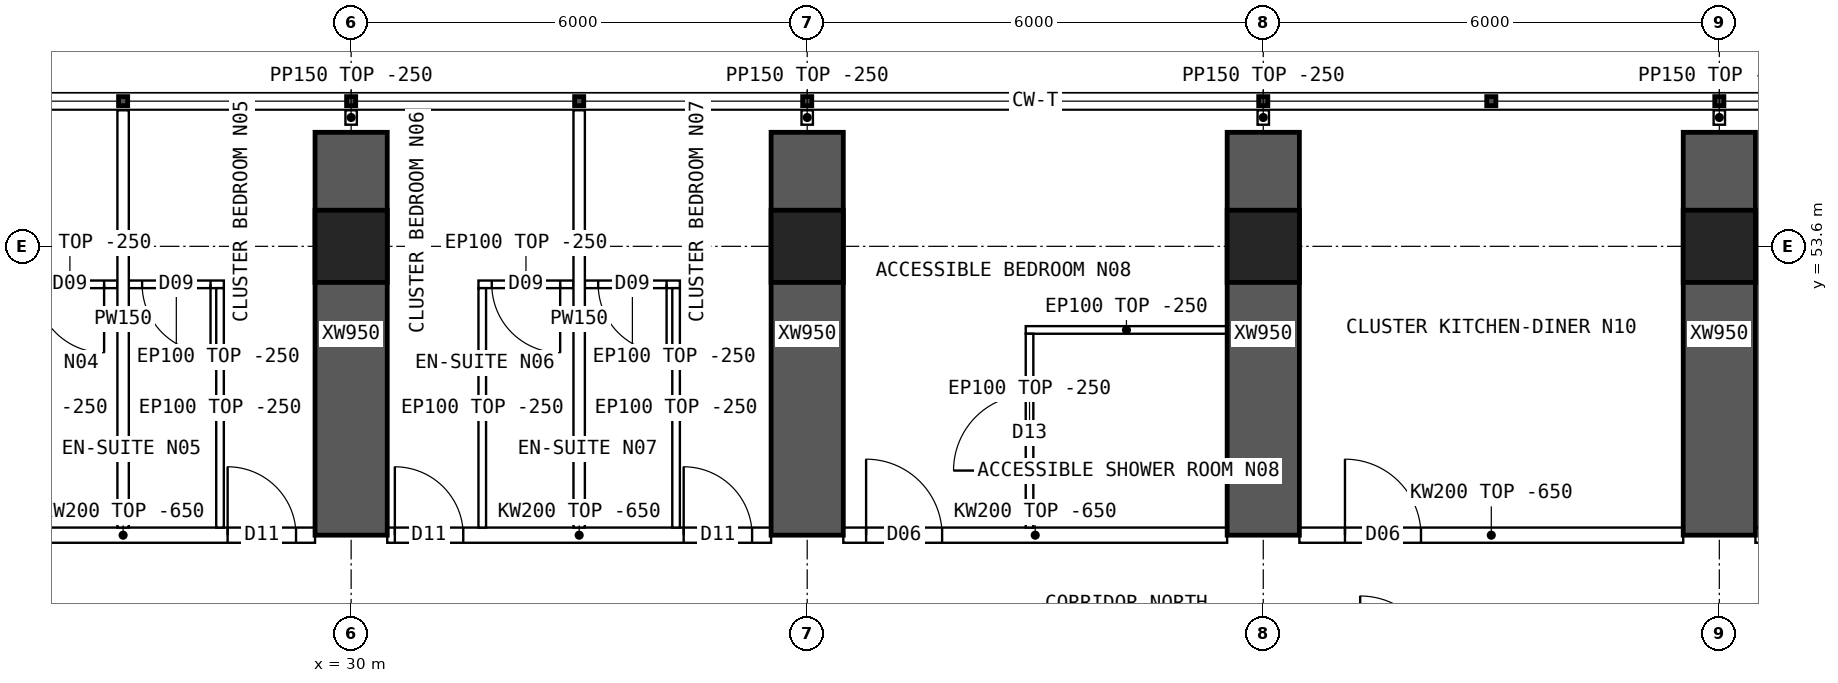
"""IFC4 building model, lengths in metres.
Left out: names, types, materials, properties, quantities, classifications, styles, units other than length and angle.
Written with IfcOpenShell. Run it as: python <this file> out.ifc"""

import sys

from ifc_helpers import new_model, si_unit, direction, frame, frame_2d, origin, origin_2d, place, context, subcontext, project, spatial, polyline, rectangle, hollow_rectangle, outline, extrude, element, fill, save


model = new_model("IFC4")
c1 = context("Model", 3, precision=1e-05, world=origin(), true_north=direction((0.0, 1.0)))
c2 = subcontext(c1, "Body", "Model", "MODEL_VIEW")
j1 = project(units=[si_unit("LENGTHUNIT", "METRE"), si_unit("PLANEANGLEUNIT", "RADIAN")], contexts=[c1])
p1 = place(None, origin())
s1 = spatial("IfcSite", under=j1, at=p1, CompositionType="ELEMENT")
p2 = place(p1, origin())
s2 = spatial("IfcBuilding", under=s1, at=p2, CompositionType="ELEMENT")
p3 = place(p2, frame((0.0, 0.0, 114.4)))
s3 = spatial("IfcBuildingStorey", under=s2, at=p3, CompositionType="ELEMENT", Elevation=114.4)
for number, where, z_axis, x_axis in (
    (1, (30.0, 53.6, 0.0), (0.0, 0.0, 1.0), (1.0, 0.0, 0.0)),
    (2, (36.0, 53.6, 0.0), (0.0, 0.0, 1.0), (1.0, 0.0, 0.0)),
    (3, (42.0, 53.6, 0.0), (0.0, 0.0, 1.0), (1.0, 0.0, 0.0)),
    (4, (48.0, 53.6, 0.0), (0.0, 0.0, 1.0), (1.0, 0.0, 0.0)),
):
    element("IfcColumn", number, at=place(p3, frame(where, z_axis=z_axis, x_axis=x_axis)), inside=s3, PredefinedType="COLUMN", context=c2, shape_type="SweptSolid", body=[
        extrude(hollow_rectangle(XDim=0.95, YDim=0.95, WallThickness=0.095, at=origin_2d()), origin(), (0.0, 0.0, 1.0), 3.75),
    ])
for number, where, z_axis, x_axis in (
    (5, (30.0, 49.8, 0.0), (0.0, 0.0, 1.0), (0.0, 1.0, 0.0)),
    (6, (36.0, 49.8, 0.0), (0.0, 0.0, 1.0), (0.0, 1.0, 0.0)),
    (7, (42.0, 49.8, 0.0), (0.0, 0.0, 1.0), (0.0, 1.0, 0.0)),
    (8, (48.0, 49.8, 0.0), (0.0, 0.0, 1.0), (0.0, 1.0, 0.0)),
):
    element("IfcWall", number, at=place(p3, frame(where, z_axis=z_axis, x_axis=x_axis)), inside=s3, PredefinedType="SHEAR", context=c2, shape_type="SweptSolid", body=[
        extrude(rectangle(XDim=5.3, YDim=0.95, at=frame_2d((2.65, 0.0))), origin(), (0.0, 0.0, 1.0), 3.75),
    ])
p4 = place(p3, frame((24.475, 49.8, 0.0), z_axis=(0.0, 0.0, 1.0), x_axis=(1.0, 0.0, 0.0)))
e9 = element("IfcWall", 9, at=p4, inside=s3, PredefinedType="SOLIDWALL", context=c2, shape_type="SweptSolid", body=[
    extrude(outline(polyline([(0.0, 0.0), (5.05, 0.0), (5.05, 3.1), (0.0, 3.1), (0.0, 0.0)])), frame((0.0, 0.1, 0.0), z_axis=(0.0, -1.0, 0.0), x_axis=(1.0, 0.0, 0.0)), (0.0, 0.0, 1.0), 0.2),
])
p5 = place(p4, frame((0.1, 0.0, 0.0)))
e10 = element("IfcOpeningElement", 10, at=p5, cuts=e9, PredefinedType="OPENING", context=c2, shape_type="SweptSolid", body=[
    extrude(rectangle(XDim=0.9, YDim=2.1, at=frame_2d((0.45, 1.05))), frame((0.0, 0.11, 0.0), z_axis=(0.0, -1.0, 0.0), x_axis=(1.0, 0.0, 0.0)), (0.0, 0.0, 1.0), 0.22),
])
p6 = place(p4, frame((3.9, 0.0, 0.0)))
e11 = element("IfcOpeningElement", 11, at=p6, cuts=e9, PredefinedType="OPENING", context=c2, shape_type="SweptSolid", body=[
    extrude(rectangle(XDim=0.9, YDim=2.1, at=frame_2d((0.45, 1.05))), frame((0.0, 0.11, 0.0), z_axis=(0.0, -1.0, 0.0), x_axis=(1.0, 0.0, 0.0)), (0.0, 0.0, 1.0), 0.22),
])
p7 = place(p3, frame((30.475, 49.8, 0.0), z_axis=(0.0, 0.0, 1.0), x_axis=(1.0, 0.0, 0.0)))
e12 = element("IfcWall", 12, at=p7, inside=s3, PredefinedType="SOLIDWALL", context=c2, shape_type="SweptSolid", body=[
    extrude(outline(polyline([(0.0, 0.0), (5.05, 0.0), (5.05, 3.1), (0.0, 3.1), (0.0, 0.0)])), frame((0.0, 0.1, 0.0), z_axis=(0.0, -1.0, 0.0), x_axis=(1.0, 0.0, 0.0)), (0.0, 0.0, 1.0), 0.2),
])
p8 = place(p7, frame((0.1, 0.0, 0.0)))
e13 = element("IfcOpeningElement", 13, at=p8, cuts=e12, PredefinedType="OPENING", context=c2, shape_type="SweptSolid", body=[
    extrude(rectangle(XDim=0.9, YDim=2.1, at=frame_2d((0.45, 1.05))), frame((0.0, 0.11, 0.0), z_axis=(0.0, -1.0, 0.0), x_axis=(1.0, 0.0, 0.0)), (0.0, 0.0, 1.0), 0.22),
])
p9 = place(p7, frame((3.9, 0.0, 0.0)))
e14 = element("IfcOpeningElement", 14, at=p9, cuts=e12, PredefinedType="OPENING", context=c2, shape_type="SweptSolid", body=[
    extrude(rectangle(XDim=0.9, YDim=2.1, at=frame_2d((0.45, 1.05))), frame((0.0, 0.11, 0.0), z_axis=(0.0, -1.0, 0.0), x_axis=(1.0, 0.0, 0.0)), (0.0, 0.0, 1.0), 0.22),
])
p10 = place(p3, frame((36.475, 49.8, 0.0), z_axis=(0.0, 0.0, 1.0), x_axis=(1.0, 0.0, 0.0)))
e15 = element("IfcWall", 15, at=p10, inside=s3, PredefinedType="SOLIDWALL", context=c2, shape_type="SweptSolid", body=[
    extrude(outline(polyline([(0.0, 0.0), (5.05, 0.0), (5.05, 3.1), (0.0, 3.1), (0.0, 0.0)])), frame((0.0, 0.1, 0.0), z_axis=(0.0, -1.0, 0.0), x_axis=(1.0, 0.0, 0.0)), (0.0, 0.0, 1.0), 0.2),
])
p11 = place(p10, frame((0.3, 0.0, 0.0)))
e16 = element("IfcOpeningElement", 16, at=p11, cuts=e15, PredefinedType="OPENING", context=c2, shape_type="SweptSolid", body=[
    extrude(rectangle(XDim=1.0, YDim=2.1, at=frame_2d((0.5, 1.05))), frame((0.0, 0.11, 0.0), z_axis=(0.0, -1.0, 0.0), x_axis=(1.0, 0.0, 0.0)), (0.0, 0.0, 1.0), 0.22),
])
p12 = place(p3, frame((42.475, 49.8, 0.0), z_axis=(0.0, 0.0, 1.0), x_axis=(1.0, 0.0, 0.0)))
e17 = element("IfcWall", 17, at=p12, inside=s3, PredefinedType="SOLIDWALL", context=c2, shape_type="SweptSolid", body=[
    extrude(outline(polyline([(0.0, 0.0), (5.05, 0.0), (5.05, 3.1), (0.0, 3.1), (0.0, 0.0)])), frame((0.0, 0.1, 0.0), z_axis=(0.0, -1.0, 0.0), x_axis=(1.0, 0.0, 0.0)), (0.0, 0.0, 1.0), 0.2),
])
p13 = place(p12, frame((0.6, 0.0, 0.0)))
e18 = element("IfcOpeningElement", 18, at=p13, cuts=e17, PredefinedType="OPENING", context=c2, shape_type="SweptSolid", body=[
    extrude(rectangle(XDim=1.0, YDim=2.1, at=frame_2d((0.5, 1.05))), frame((0.0, 0.11, 0.0), z_axis=(0.0, -1.0, 0.0), x_axis=(1.0, 0.0, 0.0)), (0.0, 0.0, 1.0), 0.22),
])
p14 = place(p3, frame((48.475, 49.8, 0.0), z_axis=(0.0, 0.0, 1.0), x_axis=(1.0, 0.0, 0.0)))
e19 = element("IfcWall", 19, at=p14, inside=s3, PredefinedType="SOLIDWALL", context=c2, shape_type="SweptSolid", body=[
    extrude(outline(polyline([(0.0, 0.0), (5.05, 0.0), (5.05, 3.1), (0.0, 3.1), (0.0, 0.0)])), frame((0.0, 0.1, 0.0), z_axis=(0.0, -1.0, 0.0), x_axis=(1.0, 0.0, 0.0)), (0.0, 0.0, 1.0), 0.2),
])
p15 = place(p14, frame((0.1, 0.0, 0.0)))
e20 = element("IfcOpeningElement", 20, at=p15, cuts=e19, PredefinedType="OPENING", context=c2, shape_type="SweptSolid", body=[
    extrude(rectangle(XDim=0.9, YDim=2.1, at=frame_2d((0.45, 1.05))), frame((0.0, 0.11, 0.0), z_axis=(0.0, -1.0, 0.0), x_axis=(1.0, 0.0, 0.0)), (0.0, 0.0, 1.0), 0.22),
])
p16 = place(p14, frame((3.9, 0.0, 0.0)))
e21 = element("IfcOpeningElement", 21, at=p16, cuts=e19, PredefinedType="OPENING", context=c2, shape_type="SweptSolid", body=[
    extrude(rectangle(XDim=0.9, YDim=2.1, at=frame_2d((0.45, 1.05))), frame((0.0, 0.11, 0.0), z_axis=(0.0, -1.0, 0.0), x_axis=(1.0, 0.0, 0.0)), (0.0, 0.0, 1.0), 0.22),
])
p17 = place(p3, frame((27.0, 55.39, 0.0), z_axis=(0.0, 0.0, 1.0), x_axis=(0.0, -1.0, 0.0)))
e22 = element("IfcWall", 22, at=p17, inside=s3, PredefinedType="PARTITIONING", context=c2, shape_type="SweptSolid", body=[
    extrude(outline(polyline([(0.0, 0.0), (5.49, 0.0), (5.49, 3.1), (5.442, 3.1), (5.44, 3.5), (1.992, 3.5), (1.99, 3.1), (1.592, 3.1), (1.59, 3.5), (0.0, 3.5), (0.0, 0.0)])), frame((0.0, 0.075, 0.0), z_axis=(0.0, -1.0, 0.0), x_axis=(1.0, 0.0, 0.0)), (0.0, 0.0, 1.0), 0.15),
])
p18 = place(p3, frame((25.675, 53.1, 0.0), z_axis=(0.0, 0.0, 1.0), x_axis=(1.0, 0.0, 0.0)))
e23 = element("IfcWall", 23, at=p18, inside=s3, PredefinedType="PARTITIONING", context=c2, shape_type="SweptSolid", body=[
    extrude(rectangle(XDim=1.25, YDim=0.1, at=frame_2d((0.625, 0.0))), origin(), (0.0, 0.0, 1.0), 3.5),
])
p19 = place(p18, frame((0.175, 0.0, 0.0)))
e24 = element("IfcOpeningElement", 24, at=p19, cuts=e23, PredefinedType="OPENING", context=c2, shape_type="SweptSolid", body=[
    extrude(rectangle(XDim=0.9, YDim=2.1, at=frame_2d((0.45, 1.05))), frame((0.0, 0.06, 0.0), z_axis=(0.0, -1.0, 0.0), x_axis=(1.0, 0.0, 0.0)), (0.0, 0.0, 1.0), 0.12),
])
p20 = place(p3, frame((27.075, 53.1, 0.0), z_axis=(0.0, 0.0, 1.0), x_axis=(1.0, 0.0, 0.0)))
e25 = element("IfcWall", 25, at=p20, inside=s3, PredefinedType="PARTITIONING", context=c2, shape_type="SweptSolid", body=[
    extrude(rectangle(XDim=1.25, YDim=0.1, at=frame_2d((0.625, 0.0))), origin(), (0.0, 0.0, 1.0), 3.5),
])
p21 = place(p20, frame((0.175, 0.0, 0.0)))
e26 = element("IfcOpeningElement", 26, at=p21, cuts=e25, PredefinedType="OPENING", context=c2, shape_type="SweptSolid", body=[
    extrude(rectangle(XDim=0.9, YDim=2.1, at=frame_2d((0.45, 1.05))), frame((0.0, 0.06, 0.0), z_axis=(0.0, -1.0, 0.0), x_axis=(1.0, 0.0, 0.0)), (0.0, 0.0, 1.0), 0.12),
])
p22 = place(p3, frame((28.275, 53.05, 0.0), z_axis=(0.0, 0.0, 1.0), x_axis=(0.0, -1.0, 0.0)))
e27 = element("IfcWall", 27, at=p22, inside=s3, PredefinedType="PARTITIONING", context=c2, shape_type="SweptSolid", body=[
    extrude(outline(polyline([(0.0, 0.0), (3.15, 0.0), (3.15, 3.1), (3.102, 3.1), (3.1, 3.5), (0.0, 3.5), (0.0, 0.0)])), frame((0.0, 0.05, 0.0), z_axis=(0.0, -1.0, 0.0), x_axis=(1.0, 0.0, 0.0)), (0.0, 0.0, 1.0), 0.1),
])
p23 = place(p3, frame((33.0, 55.39, 0.0), z_axis=(0.0, 0.0, 1.0), x_axis=(0.0, -1.0, 0.0)))
e28 = element("IfcWall", 28, at=p23, inside=s3, PredefinedType="PARTITIONING", context=c2, shape_type="SweptSolid", body=[
    extrude(outline(polyline([(0.0, 0.0), (5.49, 0.0), (5.49, 3.1), (5.442, 3.1), (5.44, 3.5), (1.992, 3.5), (1.99, 3.1), (1.592, 3.1), (1.59, 3.5), (0.0, 3.5), (0.0, 0.0)])), frame((0.0, 0.075, 0.0), z_axis=(0.0, -1.0, 0.0), x_axis=(1.0, 0.0, 0.0)), (0.0, 0.0, 1.0), 0.15),
])
p24 = place(p3, frame((31.675, 53.1, 0.0), z_axis=(0.0, 0.0, 1.0), x_axis=(1.0, 0.0, 0.0)))
e29 = element("IfcWall", 29, at=p24, inside=s3, PredefinedType="PARTITIONING", context=c2, shape_type="SweptSolid", body=[
    extrude(rectangle(XDim=1.25, YDim=0.1, at=frame_2d((0.625, 0.0))), origin(), (0.0, 0.0, 1.0), 3.5),
])
p25 = place(p24, frame((0.175, 0.0, 0.0)))
e30 = element("IfcOpeningElement", 30, at=p25, cuts=e29, PredefinedType="OPENING", context=c2, shape_type="SweptSolid", body=[
    extrude(rectangle(XDim=0.9, YDim=2.1, at=frame_2d((0.45, 1.05))), frame((0.0, 0.06, 0.0), z_axis=(0.0, -1.0, 0.0), x_axis=(1.0, 0.0, 0.0)), (0.0, 0.0, 1.0), 0.12),
])
p26 = place(p3, frame((31.725, 53.05, 0.0), z_axis=(0.0, 0.0, 1.0), x_axis=(0.0, -1.0, 0.0)))
e31 = element("IfcWall", 31, at=p26, inside=s3, PredefinedType="PARTITIONING", context=c2, shape_type="SweptSolid", body=[
    extrude(outline(polyline([(0.0, 0.0), (3.15, 0.0), (3.15, 3.1), (3.102, 3.1), (3.1, 3.5), (0.0, 3.5), (0.0, 0.0)])), frame((0.0, 0.05, 0.0), z_axis=(0.0, -1.0, 0.0), x_axis=(1.0, 0.0, 0.0)), (0.0, 0.0, 1.0), 0.1),
])
p27 = place(p3, frame((33.075, 53.1, 0.0), z_axis=(0.0, 0.0, 1.0), x_axis=(1.0, 0.0, 0.0)))
e32 = element("IfcWall", 32, at=p27, inside=s3, PredefinedType="PARTITIONING", context=c2, shape_type="SweptSolid", body=[
    extrude(rectangle(XDim=1.25, YDim=0.1, at=frame_2d((0.625, 0.0))), origin(), (0.0, 0.0, 1.0), 3.5),
])
p28 = place(p27, frame((0.175, 0.0, 0.0)))
e33 = element("IfcOpeningElement", 33, at=p28, cuts=e32, PredefinedType="OPENING", context=c2, shape_type="SweptSolid", body=[
    extrude(rectangle(XDim=0.9, YDim=2.1, at=frame_2d((0.45, 1.05))), frame((0.0, 0.06, 0.0), z_axis=(0.0, -1.0, 0.0), x_axis=(1.0, 0.0, 0.0)), (0.0, 0.0, 1.0), 0.12),
])
p29 = place(p3, frame((34.275, 53.05, 0.0), z_axis=(0.0, 0.0, 1.0), x_axis=(0.0, -1.0, 0.0)))
e34 = element("IfcWall", 34, at=p29, inside=s3, PredefinedType="PARTITIONING", context=c2, shape_type="SweptSolid", body=[
    extrude(outline(polyline([(0.0, 0.0), (3.15, 0.0), (3.15, 3.1), (3.102, 3.1), (3.1, 3.5), (0.0, 3.5), (0.0, 0.0)])), frame((0.0, 0.05, 0.0), z_axis=(0.0, -1.0, 0.0), x_axis=(1.0, 0.0, 0.0)), (0.0, 0.0, 1.0), 0.1),
])
p30 = place(p3, frame((38.875, 52.5, 0.0), z_axis=(0.0, 0.0, 1.0), x_axis=(1.0, 0.0, 0.0)))
e35 = element("IfcWall", 35, at=p30, inside=s3, PredefinedType="PARTITIONING", context=c2, shape_type="SweptSolid", body=[
    extrude(rectangle(XDim=2.65, YDim=0.1, at=frame_2d((1.325, 0.0))), origin(), (0.0, 0.0, 1.0), 3.5),
])
p31 = place(p3, frame((38.925, 52.45, 0.0), z_axis=(0.0, 0.0, 1.0), x_axis=(0.0, -1.0, 0.0)))
e36 = element("IfcWall", 36, at=p31, inside=s3, PredefinedType="PARTITIONING", context=c2, shape_type="SweptSolid", body=[
    extrude(outline(polyline([(0.0, 0.0), (2.55, 0.0), (2.55, 3.1), (2.502, 3.1), (2.5, 3.5), (0.0, 3.5), (0.0, 0.0)])), frame((0.0, 0.05, 0.0), z_axis=(0.0, -1.0, 0.0), x_axis=(1.0, 0.0, 0.0)), (0.0, 0.0, 1.0), 0.1),
])
p32 = place(p31, frame((0.8, 0.0, 0.0)))
e37 = element("IfcOpeningElement", 37, at=p32, cuts=e36, PredefinedType="OPENING", context=c2, shape_type="SweptSolid", body=[
    extrude(rectangle(XDim=1.0, YDim=2.1, at=frame_2d((0.5, 1.05))), frame((0.0, 0.06, 0.0), z_axis=(0.0, -1.0, 0.0), x_axis=(1.0, 0.0, 0.0)), (0.0, 0.0, 1.0), 0.12),
])
for number, where, z_axis, x_axis in (
    (38, (30.0, 55.2, 0.0), (0.0, 0.0, 1.0), (0.0, 1.0, 0.0)),
    (39, (36.0, 55.2, 0.0), (0.0, 0.0, 1.0), (0.0, 1.0, 0.0)),
    (40, (42.0, 55.2, 0.0), (0.0, 0.0, 1.0), (0.0, 1.0, 0.0)),
    (41, (48.0, 55.2, 0.0), (0.0, 0.0, 1.0), (0.0, 1.0, 0.0)),
):
    element("IfcWall", number, at=place(p3, frame(where, z_axis=z_axis, x_axis=x_axis)), inside=s3, PredefinedType="PARTITIONING", context=c2, shape_type="SweptSolid", body=[
        extrude(rectangle(XDim=0.19, YDim=0.15, at=frame_2d((0.095, 0.0))), origin(), (0.0, 0.0, 1.0), 3.5),
    ])
p33 = place(p19, origin())
e42 = element("IfcDoor", 42, at=p33, inside=s3, OperationType="SINGLE_SWING_RIGHT", PredefinedType="DOOR", context=c2, shape_type="SweptSolid", body=[
    extrude(rectangle(XDim=0.9, YDim=2.1, at=frame_2d((0.45, 1.05))), frame((0.0, 0.025, 0.0), z_axis=(0.0, -1.0, 0.0), x_axis=(1.0, 0.0, 0.0)), (0.0, 0.0, 1.0), 0.05),
])
fill(e24, e42)
p34 = place(p21, origin())
e43 = element("IfcDoor", 43, at=p34, inside=s3, OperationType="SINGLE_SWING_RIGHT", PredefinedType="DOOR", context=c2, shape_type="SweptSolid", body=[
    extrude(rectangle(XDim=0.9, YDim=2.1, at=frame_2d((0.45, 1.05))), frame((0.0, 0.025, 0.0), z_axis=(0.0, -1.0, 0.0), x_axis=(1.0, 0.0, 0.0)), (0.0, 0.0, 1.0), 0.05),
])
fill(e26, e43)
p35 = place(p6, origin())
e44 = element("IfcDoor", 44, at=p35, inside=s3, OperationType="SINGLE_SWING_LEFT", PredefinedType="DOOR", context=c2, shape_type="SweptSolid", body=[
    extrude(rectangle(XDim=0.9, YDim=2.1, at=frame_2d((0.45, 1.05))), frame((0.0, 0.025, 0.0), z_axis=(0.0, -1.0, 0.0), x_axis=(1.0, 0.0, 0.0)), (0.0, 0.0, 1.0), 0.05),
])
fill(e11, e44)
p36 = place(p25, origin())
e45 = element("IfcDoor", 45, at=p36, inside=s3, OperationType="SINGLE_SWING_RIGHT", PredefinedType="DOOR", context=c2, shape_type="SweptSolid", body=[
    extrude(rectangle(XDim=0.9, YDim=2.1, at=frame_2d((0.45, 1.05))), frame((0.0, 0.025, 0.0), z_axis=(0.0, -1.0, 0.0), x_axis=(1.0, 0.0, 0.0)), (0.0, 0.0, 1.0), 0.05),
])
fill(e30, e45)
p37 = place(p8, origin())
e46 = element("IfcDoor", 46, at=p37, inside=s3, OperationType="SINGLE_SWING_LEFT", PredefinedType="DOOR", context=c2, shape_type="SweptSolid", body=[
    extrude(rectangle(XDim=0.9, YDim=2.1, at=frame_2d((0.45, 1.05))), frame((0.0, 0.025, 0.0), z_axis=(0.0, -1.0, 0.0), x_axis=(1.0, 0.0, 0.0)), (0.0, 0.0, 1.0), 0.05),
])
fill(e13, e46)
p38 = place(p28, origin())
e47 = element("IfcDoor", 47, at=p38, inside=s3, OperationType="SINGLE_SWING_RIGHT", PredefinedType="DOOR", context=c2, shape_type="SweptSolid", body=[
    extrude(rectangle(XDim=0.9, YDim=2.1, at=frame_2d((0.45, 1.05))), frame((0.0, 0.025, 0.0), z_axis=(0.0, -1.0, 0.0), x_axis=(1.0, 0.0, 0.0)), (0.0, 0.0, 1.0), 0.05),
])
fill(e33, e47)
p39 = place(p9, origin())
e48 = element("IfcDoor", 48, at=p39, inside=s3, OperationType="SINGLE_SWING_LEFT", PredefinedType="DOOR", context=c2, shape_type="SweptSolid", body=[
    extrude(rectangle(XDim=0.9, YDim=2.1, at=frame_2d((0.45, 1.05))), frame((0.0, 0.025, 0.0), z_axis=(0.0, -1.0, 0.0), x_axis=(1.0, 0.0, 0.0)), (0.0, 0.0, 1.0), 0.05),
])
fill(e14, e48)
p40 = place(p32, origin())
e49 = element("IfcDoor", 49, at=p40, inside=s3, OperationType="SINGLE_SWING_RIGHT", PredefinedType="DOOR", context=c2, shape_type="SweptSolid", body=[
    extrude(rectangle(XDim=1.0, YDim=2.1, at=frame_2d((0.5, 1.05))), frame((0.0, 0.025, 0.0), z_axis=(0.0, -1.0, 0.0), x_axis=(1.0, 0.0, 0.0)), (0.0, 0.0, 1.0), 0.05),
])
fill(e37, e49)
p41 = place(p11, origin())
e50 = element("IfcDoor", 50, at=p41, inside=s3, OperationType="SINGLE_SWING_LEFT", PredefinedType="DOOR", context=c2, shape_type="SweptSolid", body=[
    extrude(rectangle(XDim=1.0, YDim=2.1, at=frame_2d((0.5, 1.05))), frame((0.0, 0.025, 0.0), z_axis=(0.0, -1.0, 0.0), x_axis=(1.0, 0.0, 0.0)), (0.0, 0.0, 1.0), 0.05),
])
fill(e16, e50)
p42 = place(p13, origin())
e51 = element("IfcDoor", 51, at=p42, inside=s3, OperationType="SINGLE_SWING_LEFT", PredefinedType="DOOR", context=c2, shape_type="SweptSolid", body=[
    extrude(rectangle(XDim=1.0, YDim=2.1, at=frame_2d((0.5, 1.05))), frame((0.0, 0.025, 0.0), z_axis=(0.0, -1.0, 0.0), x_axis=(1.0, 0.0, 0.0)), (0.0, 0.0, 1.0), 0.05),
])
fill(e18, e51)
save(model, sys.argv[1])
